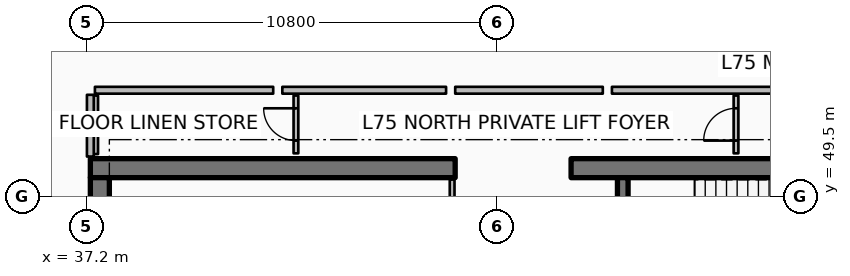
"""IFC4 building model, lengths in metres.
Left out: names, types, materials, properties, quantities, classifications, styles, units other than length and angle.
Written with IfcOpenShell. Run it as: python <this file> out.ifc"""

import sys

from ifc_helpers import new_model, si_unit, direction, frame, frame_2d, origin, place, context, subcontext, project, spatial, rectangle, extrude, element, fill, save


model = new_model("IFC4")
c1 = context("Model", 3, precision=1e-05, world=origin(), true_north=direction((0.0, 1.0)))
c2 = subcontext(c1, "Body", "Model", "MODEL_VIEW")
j1 = project(units=[si_unit("LENGTHUNIT", "METRE"), si_unit("PLANEANGLEUNIT", "RADIAN")], contexts=[c1])
p1 = place(None, origin())
s1 = spatial("IfcSite", under=j1, at=p1, CompositionType="ELEMENT")
p2 = place(p1, origin())
s2 = spatial("IfcBuilding", under=s1, at=p2, CompositionType="ELEMENT")
p3 = place(p2, frame((0.0, 0.0, 298.3)))
s3 = spatial("IfcBuildingStorey", under=s2, at=p3, CompositionType="ELEMENT", Elevation=298.3)
p4 = place(p3, frame((37.3, 50.25, 0.0), z_axis=(0.0, 0.0, 1.0), x_axis=(1.0, 0.0, 0.0)))
e1 = element("IfcWall", 1, at=p4, inside=s3, PredefinedType="SHEAR", context=c2, shape_type="SweptSolid", body=[
    extrude(rectangle(XDim=9.6, YDim=0.5, at=frame_2d((4.8, 0.0))), origin(), (0.0, 0.0, 1.0), 3.85),
])
p5 = place(p3, frame((49.95, 50.25, 0.0), z_axis=(0.0, 0.0, 1.0), x_axis=(1.0, 0.0, 0.0)))
e2 = element("IfcWall", 2, at=p5, inside=s3, PredefinedType="SHEAR", context=c2, shape_type="SweptSolid", body=[
    extrude(rectangle(XDim=9.6, YDim=0.5, at=frame_2d((4.8, 0.0))), origin(), (0.0, 0.0, 1.0), 3.85),
])
p6 = place(p3, frame((37.55, 34.0, 0.0), z_axis=(0.0, 0.0, 1.0), x_axis=(0.0, 1.0, 0.0)))
e3 = element("IfcWall", 3, at=p6, inside=s3, PredefinedType="SHEAR", context=c2, shape_type="SweptSolid", body=[
    extrude(rectangle(XDim=16.0, YDim=0.5, at=frame_2d((8.0, 0.0))), origin(), (0.0, 0.0, 1.0), 3.85),
])
p7 = place(p3, frame((51.31, 46.5, 0.0), z_axis=(0.0, 0.0, 1.0), x_axis=(0.0, 1.0, 0.0)))
e4 = element("IfcWall", 4, at=p7, inside=s3, PredefinedType="SHEAR", context=c2, shape_type="SweptSolid", body=[
    extrude(rectangle(XDim=3.5, YDim=0.28, at=frame_2d((1.75, 0.0))), origin(), (0.0, 0.0, 1.0), 3.85),
])
p8 = place(p3, frame((46.82, 47.92, 0.0), z_axis=(0.0, 0.0, 1.0), x_axis=(0.0, 1.0, 0.0)))
e5 = element("IfcWall", 5, at=p8, inside=s3, PredefinedType="PARTITIONING", context=c2, shape_type="SweptSolid", body=[
    extrude(rectangle(XDim=2.03, YDim=0.125, at=frame_2d((1.015, 0.0))), origin(), (0.0, 0.0, 1.0), 3.03),
])
p9 = place(p3, frame((37.44, 50.62, 0.0), z_axis=(0.0, 0.0, 1.0), x_axis=(0.0, 1.0, 0.0)))
e6 = element("IfcWall", 6, at=p9, inside=s3, PredefinedType="PARTITIONING", context=c2, shape_type="SweptSolid", body=[
    extrude(rectangle(XDim=1.54, YDim=0.125, at=frame_2d((0.77, 0.0))), origin(), (0.0, 0.0, 1.0), 3.03),
])
p10 = place(p3, frame((42.71, 50.64, 0.0), z_axis=(0.0, 0.0, 1.0), x_axis=(0.0, 1.0, 0.0)))
e7 = element("IfcWall", 7, at=p10, inside=s3, PredefinedType="PARTITIONING", context=c2, shape_type="SweptSolid", body=[
    extrude(rectangle(XDim=1.52, YDim=0.125, at=frame_2d((0.76, 0.0))), origin(), (0.0, 0.0, 1.0), 2.957),
])
p11 = place(p10, frame((0.335, 0.0, 0.0)))
e8 = element("IfcOpeningElement", 8, at=p11, cuts=e7, PredefinedType="OPENING", context=c2, shape_type="SweptSolid", body=[
    extrude(rectangle(XDim=0.85, YDim=2.06, at=frame_2d((0.425, 1.03))), frame((0.0, 0.073, 0.0), z_axis=(0.0, -1.0, 0.0), x_axis=(1.0, 0.0, 0.0)), (0.0, 0.0, 1.0), 0.145),
])
p12 = place(p3, frame((54.29, 50.64, 0.0), z_axis=(0.0, 0.0, 1.0), x_axis=(0.0, 1.0, 0.0)))
e9 = element("IfcWall", 9, at=p12, inside=s3, PredefinedType="PARTITIONING", context=c2, shape_type="SweptSolid", body=[
    extrude(rectangle(XDim=1.52, YDim=0.125, at=frame_2d((0.76, 0.0))), origin(), (0.0, 0.0, 1.0), 3.03),
])
p13 = place(p12, frame((0.335, 0.0, 0.0)))
e10 = element("IfcOpeningElement", 10, at=p13, cuts=e9, PredefinedType="OPENING", context=c2, shape_type="SweptSolid", body=[
    extrude(rectangle(XDim=0.85, YDim=2.06, at=frame_2d((0.425, 1.03))), frame((0.0, 0.073, 0.0), z_axis=(0.0, -1.0, 0.0), x_axis=(1.0, 0.0, 0.0)), (0.0, 0.0, 1.0), 0.145),
])
p14 = place(p3, frame((56.0, 52.3, 0.0), z_axis=(0.0, 0.0, 1.0), x_axis=(-1.0, 0.0, 0.0)))
e11 = element("IfcWall", 11, at=p14, inside=s3, PredefinedType="PARTITIONING", context=c2, shape_type="SweptSolid", body=[
    extrude(rectangle(XDim=4.975, YDim=0.18, at=frame_2d((2.488, 0.0))), origin(), (0.0, 0.0, 1.0), 2.957),
])
p15 = place(p3, frame((50.785, 52.3, 0.0), z_axis=(0.0, 0.0, 1.0), x_axis=(-1.0, 0.0, 0.0)))
e12 = element("IfcWall", 12, at=p15, inside=s3, PredefinedType="PARTITIONING", context=c2, shape_type="SweptSolid", body=[
    extrude(rectangle(XDim=3.884, YDim=0.18, at=frame_2d((1.942, 0.0))), origin(), (0.0, 0.0, 1.0), 2.957),
])
p16 = place(p3, frame((46.661, 52.3, 0.0), z_axis=(0.0, 0.0, 1.0), x_axis=(-1.0, 0.0, 0.0)))
e13 = element("IfcWall", 13, at=p16, inside=s3, PredefinedType="PARTITIONING", context=c2, shape_type="SweptSolid", body=[
    extrude(rectangle(XDim=4.309, YDim=0.18, at=frame_2d((2.155, 0.0))), origin(), (0.0, 0.0, 1.0), 2.957),
])
p17 = place(p3, frame((42.112, 52.3, 0.0), z_axis=(0.0, 0.0, 1.0), x_axis=(-1.0, 0.0, 0.0)))
e14 = element("IfcWall", 14, at=p17, inside=s3, PredefinedType="PARTITIONING", context=c2, shape_type="SweptSolid", body=[
    extrude(rectangle(XDim=4.692, YDim=0.18, at=frame_2d((2.346, 0.0))), origin(), (0.0, 0.0, 1.0), 2.957),
])
p18 = place(p3, frame((37.3, 52.18, 0.0), z_axis=(0.0, 0.0, 1.0), x_axis=(0.0, -1.0, 0.0)))
e15 = element("IfcWall", 15, at=p18, inside=s3, PredefinedType="PARTITIONING", context=c2, shape_type="SweptSolid", body=[
    extrude(rectangle(XDim=1.625, YDim=0.18, at=frame_2d((0.812, 0.0))), origin(), (0.0, 0.0, 1.0), 2.957),
])
p19 = place(p11, origin())
e16 = element("IfcDoor", 16, at=p19, inside=s3, OperationType="SINGLE_SWING_RIGHT", PredefinedType="DOOR", context=c2, shape_type="SweptSolid", body=[
    extrude(rectangle(XDim=0.85, YDim=2.06, at=frame_2d((0.425, 1.03))), frame((0.0, 0.025, 0.0), z_axis=(0.0, -1.0, 0.0), x_axis=(1.0, 0.0, 0.0)), (0.0, 0.0, 1.0), 0.05),
])
fill(e8, e16)
p20 = place(p13, origin())
e17 = element("IfcDoor", 17, at=p20, inside=s3, OperationType="SINGLE_SWING_LEFT", PredefinedType="DOOR", context=c2, shape_type="SweptSolid", body=[
    extrude(rectangle(XDim=0.85, YDim=2.06, at=frame_2d((0.425, 1.03))), frame((0.0, 0.025, 0.0), z_axis=(0.0, -1.0, 0.0), x_axis=(1.0, 0.0, 0.0)), (0.0, 0.0, 1.0), 0.05),
])
fill(e10, e17)
save(model, sys.argv[1])
